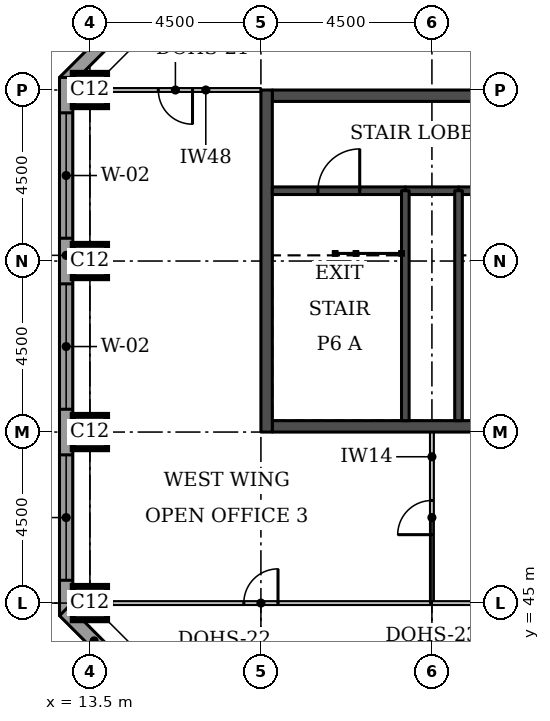
"""IFC4 building model, lengths in metres.
Left out: names, types, materials, properties, quantities, classifications, styles, units other than length and angle.
Written with IfcOpenShell. Run it as: python <this file> out.ifc"""

import sys

from ifc_helpers import new_model, si_unit, direction, frame, frame_2d, origin, origin_2d, place, context, subcontext, project, spatial, rectangle, extrude, element, fill, save


model = new_model("IFC4")
c1 = context("Model", 3, precision=1e-05, world=origin(), true_north=direction((0.0, 1.0)))
c2 = subcontext(c1, "Body", "Model", "MODEL_VIEW")
j1 = project(units=[si_unit("LENGTHUNIT", "METRE"), si_unit("PLANEANGLEUNIT", "RADIAN")], contexts=[c1])
p1 = place(None, origin())
s1 = spatial("IfcSite", under=j1, at=p1, CompositionType="ELEMENT")
p2 = place(p1, origin())
s2 = spatial("IfcBuilding", under=s1, at=p2, CompositionType="ELEMENT")
p3 = place(p2, frame((0.0, 0.0, 260.0)))
s3 = spatial("IfcBuildingStorey", under=s2, at=p3, CompositionType="ELEMENT", Elevation=260.0)
for number, where, z_axis, x_axis in (
    (1, (13.5, 45.0, 0.0), (0.0, 0.0, 1.0), (1.0, 0.0, 0.0)),
    (2, (13.5, 49.5, 0.0), (0.0, 0.0, 1.0), (1.0, 0.0, 0.0)),
    (3, (13.5, 54.0, 0.0), (0.0, 0.0, 1.0), (1.0, 0.0, 0.0)),
    (4, (13.5, 58.5, 0.0), (0.0, 0.0, 1.0), (1.0, 0.0, 0.0)),
):
    element("IfcColumn", number, at=place(p3, frame(where, z_axis=z_axis, x_axis=x_axis)), inside=s3, PredefinedType="COLUMN", context=c2, shape_type="SweptSolid", body=[
        extrude(rectangle(XDim=0.9, YDim=0.9, at=origin_2d()), origin(), (0.0, 0.0, 1.0), 3.7),
    ])
for number, where, z_axis, x_axis in (
    (5, (18.3, 49.65, 0.0), (0.0, 0.0, 1.0), (1.0, 0.0, 0.0)),
    (6, (18.3, 58.35, 0.0), (0.0, 0.0, 1.0), (1.0, 0.0, 0.0)),
):
    element("IfcWall", number, at=place(p3, frame(where, z_axis=z_axis, x_axis=x_axis)), inside=s3, PredefinedType="SHEAR", context=c2, shape_type="SweptSolid", body=[
        extrude(rectangle(XDim=8.4, YDim=0.3, at=frame_2d((4.2, 0.0))), origin(), (0.0, 0.0, 1.0), 3.7),
    ])
p4 = place(p3, frame((18.15, 49.5, 0.0), z_axis=(0.0, 0.0, 1.0), x_axis=(0.0, 1.0, 0.0)))
e7 = element("IfcWall", 7, at=p4, inside=s3, PredefinedType="SHEAR", context=c2, shape_type="SweptSolid", body=[
    extrude(rectangle(XDim=9.0, YDim=0.3, at=frame_2d((4.5, 0.0))), origin(), (0.0, 0.0, 1.0), 3.7),
])
p5 = place(p3, frame((17.792, 63.676, 0.0), z_axis=(0.0, 0.0, 1.0), x_axis=(-0.707106781187, -0.707106781187, 0.0)))
e8 = element("IfcWall", 8, at=p5, inside=s3, PredefinedType="STANDARD", context=c2, shape_type="SweptSolid", body=[
    extrude(rectangle(XDim=7.027, YDim=0.35, at=frame_2d((3.513, 0.0))), origin(), (0.0, 0.0, 1.0), 3.375),
])
p6 = place(p5, frame((1.863, 0.0, 0.9)))
e9 = element("IfcOpeningElement", 9, at=p6, cuts=e8, PredefinedType="OPENING", context=c2, shape_type="SweptSolid", body=[
    extrude(rectangle(XDim=3.3, YDim=1.9, at=frame_2d((1.65, 0.95))), frame((0.0, 0.185, 0.0), z_axis=(0.0, -1.0, 0.0), x_axis=(1.0, 0.0, 0.0)), (0.0, 0.0, 1.0), 0.37),
])
p7 = place(p3, frame((12.875, 58.831, 0.0), z_axis=(0.0, 0.0, 1.0), x_axis=(0.0, -1.0, 0.0)))
e10 = element("IfcWall", 10, at=p7, inside=s3, PredefinedType="STANDARD", context=c2, shape_type="SweptSolid", body=[
    extrude(rectangle(XDim=14.163, YDim=0.35, at=frame_2d((7.081, 0.0))), origin(), (0.0, 0.0, 1.0), 3.375),
])
p8 = place(p7, frame((0.931, 0.0, 0.9)))
e11 = element("IfcOpeningElement", 11, at=p8, cuts=e10, PredefinedType="OPENING", context=c2, shape_type="SweptSolid", body=[
    extrude(rectangle(XDim=3.3, YDim=1.9, at=frame_2d((1.65, 0.95))), frame((0.0, 0.185, 0.0), z_axis=(0.0, -1.0, 0.0), x_axis=(1.0, 0.0, 0.0)), (0.0, 0.0, 1.0), 0.37),
])
p9 = place(p7, frame((5.431, 0.0, 0.9)))
e12 = element("IfcOpeningElement", 12, at=p9, cuts=e10, PredefinedType="OPENING", context=c2, shape_type="SweptSolid", body=[
    extrude(rectangle(XDim=3.3, YDim=1.9, at=frame_2d((1.65, 0.95))), frame((0.0, 0.185, 0.0), z_axis=(0.0, -1.0, 0.0), x_axis=(1.0, 0.0, 0.0)), (0.0, 0.0, 1.0), 0.37),
])
p10 = place(p7, frame((9.931, 0.0, 0.9)))
e13 = element("IfcOpeningElement", 13, at=p10, cuts=e10, PredefinedType="OPENING", context=c2, shape_type="SweptSolid", body=[
    extrude(rectangle(XDim=3.3, YDim=1.9, at=frame_2d((1.65, 0.95))), frame((0.0, 0.185, 0.0), z_axis=(0.0, -1.0, 0.0), x_axis=(1.0, 0.0, 0.0)), (0.0, 0.0, 1.0), 0.37),
])
p11 = place(p3, frame((12.824, 44.792, 0.0), z_axis=(0.0, 0.0, 1.0), x_axis=(0.707106781187, -0.707106781187, 0.0)))
e14 = element("IfcWall", 14, at=p11, inside=s3, PredefinedType="STANDARD", context=c2, shape_type="SweptSolid", body=[
    extrude(rectangle(XDim=7.027, YDim=0.35, at=frame_2d((3.513, 0.0))), origin(), (0.0, 0.0, 1.0), 3.375),
])
p12 = place(p11, frame((1.863, 0.0, 0.9)))
e15 = element("IfcOpeningElement", 15, at=p12, cuts=e14, PredefinedType="OPENING", context=c2, shape_type="SweptSolid", body=[
    extrude(rectangle(XDim=3.3, YDim=1.9, at=frame_2d((1.65, 0.95))), frame((0.0, 0.185, 0.0), z_axis=(0.0, -1.0, 0.0), x_axis=(1.0, 0.0, 0.0)), (0.0, 0.0, 1.0), 0.37),
])
p13 = place(p3, frame((13.5, 58.5, 0.0), z_axis=(0.0, 0.0, 1.0), x_axis=(1.0, 0.0, 0.0)))
e16 = element("IfcWall", 16, at=p13, inside=s3, PredefinedType="PARTITIONING", context=c2, shape_type="SweptSolid", body=[
    extrude(rectangle(XDim=4.5, YDim=0.1, at=frame_2d((2.25, 0.0))), origin(), (0.0, 0.0, 1.0), 2.4),
])
p14 = place(p13, frame((1.8, 0.0, 0.0)))
e17 = element("IfcOpeningElement", 17, at=p14, cuts=e16, PredefinedType="OPENING", context=c2, shape_type="SweptSolid", body=[
    extrude(rectangle(XDim=0.9, YDim=2.1, at=frame_2d((0.45, 1.05))), frame((0.0, 0.06, 0.0), z_axis=(0.0, -1.0, 0.0), x_axis=(1.0, 0.0, 0.0)), (0.0, 0.0, 1.0), 0.12),
])
p15 = place(p3, frame((22.5, 45.0, 0.0), z_axis=(0.0, 0.0, 1.0), x_axis=(-1.0, 0.0, 0.0)))
e18 = element("IfcWall", 18, at=p15, inside=s3, PredefinedType="PARTITIONING", context=c2, shape_type="SweptSolid", body=[
    extrude(rectangle(XDim=9.0, YDim=0.1, at=frame_2d((4.5, 0.0))), origin(), (0.0, 0.0, 1.0), 2.4),
])
p16 = place(p15, frame((4.05, 0.0, 0.0)))
e19 = element("IfcOpeningElement", 19, at=p16, cuts=e18, PredefinedType="OPENING", context=c2, shape_type="SweptSolid", body=[
    extrude(rectangle(XDim=0.9, YDim=2.1, at=frame_2d((0.45, 1.05))), frame((0.0, 0.06, 0.0), z_axis=(0.0, -1.0, 0.0), x_axis=(1.0, 0.0, 0.0)), (0.0, 0.0, 1.0), 0.12),
])
p17 = place(p3, frame((22.5, 49.5, 0.0), z_axis=(0.0, 0.0, 1.0), x_axis=(0.0, -1.0, 0.0)))
e20 = element("IfcWall", 20, at=p17, inside=s3, PredefinedType="PARTITIONING", context=c2, shape_type="SweptSolid", body=[
    extrude(rectangle(XDim=4.5, YDim=0.1, at=frame_2d((2.25, 0.0))), origin(), (0.0, 0.0, 1.0), 3.45),
])
p18 = place(p17, frame((1.8, 0.0, 0.0)))
e21 = element("IfcOpeningElement", 21, at=p18, cuts=e20, PredefinedType="OPENING", context=c2, shape_type="SweptSolid", body=[
    extrude(rectangle(XDim=0.9, YDim=2.1, at=frame_2d((0.45, 1.05))), frame((0.0, 0.06, 0.0), z_axis=(0.0, -1.0, 0.0), x_axis=(1.0, 0.0, 0.0)), (0.0, 0.0, 1.0), 0.12),
])
p19 = place(p3, frame((22.5, 45.0, 0.0), z_axis=(0.0, 0.0, 1.0), x_axis=(1.0, 0.0, 0.0)))
e22 = element("IfcWall", 22, at=p19, inside=s3, PredefinedType="PARTITIONING", context=c2, shape_type="SweptSolid", body=[
    extrude(rectangle(XDim=4.5, YDim=0.1, at=frame_2d((2.25, 0.0))), origin(), (0.0, 0.0, 1.0), 2.4),
])
p20 = place(p3, frame((21.8, 55.85, 0.0), z_axis=(0.0, 0.0, 1.0), x_axis=(1.0, 0.0, 0.0)))
e23 = element("IfcWall", 23, at=p20, inside=s3, PredefinedType="SOLIDWALL", context=c2, shape_type="SweptSolid", body=[
    extrude(rectangle(XDim=1.4, YDim=0.2, at=frame_2d((0.7, 0.0))), origin(), (0.0, 0.0, 1.0), 3.45),
])
p21 = place(p3, frame((18.3, 55.85, 0.0), z_axis=(0.0, 0.0, 1.0), x_axis=(1.0, 0.0, 0.0)))
e24 = element("IfcWall", 24, at=p21, inside=s3, PredefinedType="SOLIDWALL", context=c2, shape_type="SweptSolid", body=[
    extrude(rectangle(XDim=3.5, YDim=0.2, at=frame_2d((1.75, 0.0))), origin(), (0.0, 0.0, 1.0), 3.45),
])
p22 = place(p21, frame((1.2, 0.0, 0.0)))
e25 = element("IfcOpeningElement", 25, at=p22, cuts=e24, PredefinedType="OPENING", context=c2, shape_type="SweptSolid", body=[
    extrude(rectangle(XDim=1.1, YDim=2.1, at=frame_2d((0.55, 1.05))), frame((0.0, 0.11, 0.0), z_axis=(0.0, -1.0, 0.0), x_axis=(1.0, 0.0, 0.0)), (0.0, 0.0, 1.0), 0.22),
])
p23 = place(p3, frame((23.2, 55.85, 0.0), z_axis=(0.0, 0.0, 1.0), x_axis=(1.0, 0.0, 0.0)))
e26 = element("IfcWall", 26, at=p23, inside=s3, PredefinedType="SOLIDWALL", context=c2, shape_type="SweptSolid", body=[
    extrude(rectangle(XDim=3.5, YDim=0.2, at=frame_2d((1.75, 0.0))), origin(), (0.0, 0.0, 1.0), 3.45),
])
p24 = place(p23, frame((1.2, 0.0, 0.0)))
e27 = element("IfcOpeningElement", 27, at=p24, cuts=e26, PredefinedType="OPENING", context=c2, shape_type="SweptSolid", body=[
    extrude(rectangle(XDim=1.1, YDim=2.1, at=frame_2d((0.55, 1.05))), frame((0.0, 0.11, 0.0), z_axis=(0.0, -1.0, 0.0), x_axis=(1.0, 0.0, 0.0)), (0.0, 0.0, 1.0), 0.22),
])
for number, where, z_axis, x_axis in (
    (28, (21.8, 49.8, 0.0), (0.0, 0.0, 1.0), (0.0, 1.0, 0.0)),
    (29, (23.2, 49.8, 0.0), (0.0, 0.0, 1.0), (0.0, 1.0, 0.0)),
):
    element("IfcWall", number, at=place(p3, frame(where, z_axis=z_axis, x_axis=x_axis)), inside=s3, PredefinedType="SOLIDWALL", context=c2, shape_type="SweptSolid", body=[
        extrude(rectangle(XDim=6.05, YDim=0.2, at=frame_2d((3.025, 0.0))), origin(), (0.0, 0.0, 1.0), 3.45),
    ])
p25 = place(p8, origin())
e30 = element("IfcWindow", 30, at=p25, inside=s3, PartitioningType="SINGLE_PANEL", PredefinedType="WINDOW", context=c2, shape_type="SweptSolid", body=[
    extrude(rectangle(XDim=3.3, YDim=1.9, at=frame_2d((1.65, 0.95))), frame((0.0, 0.085, 0.0), z_axis=(0.0, -1.0, 0.0), x_axis=(1.0, 0.0, 0.0)), (0.0, 0.0, 1.0), 0.06),
])
fill(e11, e30)
p26 = place(p9, origin())
e31 = element("IfcWindow", 31, at=p26, inside=s3, PartitioningType="SINGLE_PANEL", PredefinedType="WINDOW", context=c2, shape_type="SweptSolid", body=[
    extrude(rectangle(XDim=3.3, YDim=1.9, at=frame_2d((1.65, 0.95))), frame((0.0, 0.085, 0.0), z_axis=(0.0, -1.0, 0.0), x_axis=(1.0, 0.0, 0.0)), (0.0, 0.0, 1.0), 0.06),
])
fill(e12, e31)
p27 = place(p10, origin())
e32 = element("IfcWindow", 32, at=p27, inside=s3, PartitioningType="SINGLE_PANEL", PredefinedType="WINDOW", context=c2, shape_type="SweptSolid", body=[
    extrude(rectangle(XDim=3.3, YDim=1.9, at=frame_2d((1.65, 0.95))), frame((0.0, 0.085, 0.0), z_axis=(0.0, -1.0, 0.0), x_axis=(1.0, 0.0, 0.0)), (0.0, 0.0, 1.0), 0.06),
])
fill(e13, e32)
p28 = place(p14, frame((0.9, 0.0, 0.0), z_axis=(0.0, 0.0, 1.0), x_axis=(-1.0, 0.0, 0.0)))
e33 = element("IfcDoor", 33, at=p28, inside=s3, OperationType="SINGLE_SWING_LEFT", PredefinedType="DOOR", context=c2, shape_type="SweptSolid", body=[
    extrude(rectangle(XDim=0.9, YDim=2.1, at=frame_2d((0.45, 1.05))), frame((0.0, 0.025, 0.0), z_axis=(0.0, -1.0, 0.0), x_axis=(1.0, 0.0, 0.0)), (0.0, 0.0, 1.0), 0.05),
])
fill(e17, e33)
p29 = place(p16, frame((0.9, 0.0, 0.0), z_axis=(0.0, 0.0, 1.0), x_axis=(-1.0, 0.0, 0.0)))
e34 = element("IfcDoor", 34, at=p29, inside=s3, OperationType="SINGLE_SWING_RIGHT", PredefinedType="DOOR", context=c2, shape_type="SweptSolid", body=[
    extrude(rectangle(XDim=0.9, YDim=2.1, at=frame_2d((0.45, 1.05))), frame((0.0, 0.025, 0.0), z_axis=(0.0, -1.0, 0.0), x_axis=(1.0, 0.0, 0.0)), (0.0, 0.0, 1.0), 0.05),
])
fill(e19, e34)
p30 = place(p18, frame((0.9, 0.0, 0.0), z_axis=(0.0, 0.0, 1.0), x_axis=(-1.0, 0.0, 0.0)))
e35 = element("IfcDoor", 35, at=p30, inside=s3, OperationType="SINGLE_SWING_LEFT", PredefinedType="DOOR", context=c2, shape_type="SweptSolid", body=[
    extrude(rectangle(XDim=0.9, YDim=2.1, at=frame_2d((0.45, 1.05))), frame((0.0, 0.025, 0.0), z_axis=(0.0, -1.0, 0.0), x_axis=(1.0, 0.0, 0.0)), (0.0, 0.0, 1.0), 0.05),
])
fill(e21, e35)
p31 = place(p22, origin())
e36 = element("IfcDoor", 36, at=p31, inside=s3, OperationType="SINGLE_SWING_RIGHT", PredefinedType="DOOR", context=c2, shape_type="SweptSolid", body=[
    extrude(rectangle(XDim=1.1, YDim=2.1, at=frame_2d((0.55, 1.05))), frame((0.0, 0.025, 0.0), z_axis=(0.0, -1.0, 0.0), x_axis=(1.0, 0.0, 0.0)), (0.0, 0.0, 1.0), 0.05),
])
fill(e25, e36)
save(model, sys.argv[1])
